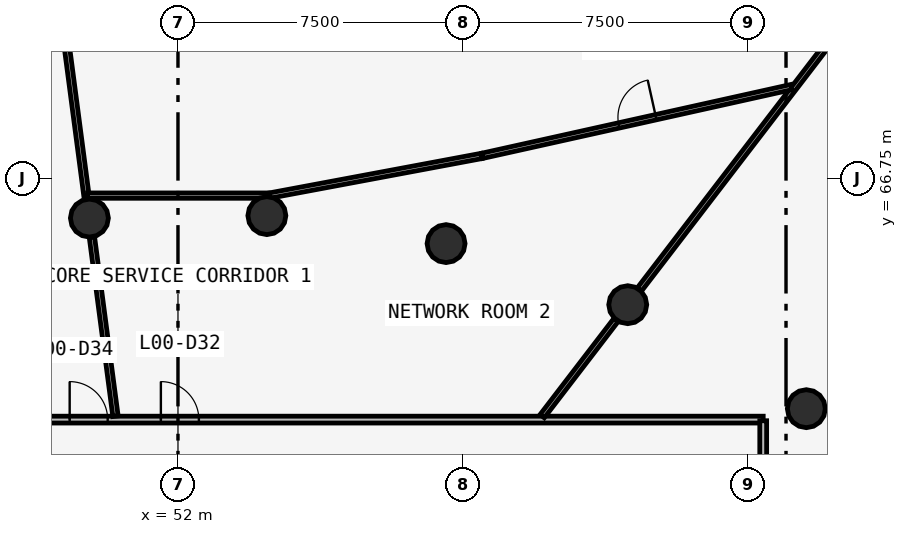
"""IFC4 building model, lengths in metres.
Left out: names, types, materials, properties, quantities, classifications, styles, units other than length and angle.
Written with IfcOpenShell. Run it as: python <this file> out.ifc"""

import sys

from ifc_helpers import new_model, si_unit, direction, frame, frame_2d, origin, origin_2d, place, context, subcontext, project, spatial, rectangle, circle, extrude, source, transform, mapped, element, fill, save


model = new_model("IFC4")
c1 = context("Model", 3, precision=1e-05, world=origin(), true_north=direction((0.0, 1.0)))
c2 = subcontext(c1, "Body", "Model", "MODEL_VIEW")
j1 = project(units=[si_unit("LENGTHUNIT", "METRE"), si_unit("PLANEANGLEUNIT", "RADIAN")], contexts=[c1])
p1 = place(None, origin())
s1 = spatial("IfcSite", under=j1, at=p1, CompositionType="ELEMENT")
p2 = place(p1, origin())
s2 = spatial("IfcBuilding", under=s1, at=p2, CompositionType="ELEMENT")
p3 = place(p2, origin())
s3 = spatial("IfcBuildingStorey", under=s2, at=p3, CompositionType="ELEMENT", Elevation=0.0)
m1 = source(origin(), c2, "Body", "SweptSolid", [
    extrude(circle(Radius=0.5, at=origin_2d()), origin(), (0.0, 0.0, 1.0), 5.35),
])
for number, where, z_axis, x_axis in (
    (1, (68.535, 60.688, -0.35), (0.0, 0.0, 1.0), (1.0, 0.0, 0.0)),
    (2, (63.835, 63.424, -0.35), (0.0, 0.0, 1.0), (1.0, 0.0, 0.0)),
    (3, (59.055, 65.031, -0.35), (0.0, 0.0, 1.0), (1.0, 0.0, 0.0)),
    (4, (54.339, 65.767, -0.35), (0.0, 0.0, 1.0), (1.0, 0.0, 0.0)),
    (5, (49.669, 65.703, -0.35), (0.0, 0.0, 1.0), (1.0, 0.0, 0.0)),
):
    element("IfcColumn", number, at=place(p3, frame(where, z_axis=z_axis, x_axis=x_axis)), inside=s3, PredefinedType="COLUMN", context=c2, shape_type="MappedRepresentation", body=[
        mapped(m1, transform((0.0, 0.0, 0.0), scale=1.0)),
    ])
p4 = place(p3, frame((36.6, 60.4, 0.0), z_axis=(0.0, 0.0, 1.0), x_axis=(1.0, 0.0, 0.0)))
e6 = element("IfcWall", 6, at=p4, inside=s3, PredefinedType="PARTITIONING", context=c2, shape_type="SweptSolid", body=[
    extrude(rectangle(XDim=30.8, YDim=0.18, at=frame_2d((15.4, 0.0))), origin(), (0.0, 0.0, 1.0), 3.85),
])
p5 = place(p4, frame((14.95, 0.0, 0.0)))
e7 = element("IfcOpeningElement", 7, at=p5, cuts=e6, PredefinedType="OPENING", context=c2, shape_type="SweptSolid", body=[
    extrude(rectangle(XDim=1.0, YDim=2.1, at=frame_2d((0.5, 1.05))), frame((0.0, 0.1, 0.0), z_axis=(0.0, -1.0, 0.0), x_axis=(1.0, 0.0, 0.0)), (0.0, 0.0, 1.0), 0.2),
])
p6 = place(p4, frame((12.55, 0.0, 0.0)))
e8 = element("IfcOpeningElement", 8, at=p6, cuts=e6, PredefinedType="OPENING", context=c2, shape_type="SweptSolid", body=[
    extrude(rectangle(XDim=1.0, YDim=2.1, at=frame_2d((0.5, 1.05))), frame((0.0, 0.1, 0.0), z_axis=(0.0, -1.0, 0.0), x_axis=(1.0, 0.0, 0.0)), (0.0, 0.0, 1.0), 0.2),
])
p7 = place(p3, frame((67.4, 60.37, 0.0), z_axis=(0.0, 0.0, 1.0), x_axis=(0.0, -1.0, 0.0)))
e9 = element("IfcWall", 9, at=p7, inside=s3, PredefinedType="PARTITIONING", context=c2, shape_type="SweptSolid", body=[
    extrude(rectangle(XDim=23.583, YDim=0.18, at=frame_2d((11.791, 0.0))), origin(), (0.0, 0.0, 1.0), 3.85),
])
p8 = place(p7, frame((11.333, 0.0, 0.0)))
e10 = element("IfcOpeningElement", 10, at=p8, cuts=e9, PredefinedType="OPENING", context=c2, shape_type="SweptSolid", body=[
    extrude(rectangle(XDim=1.0, YDim=2.1, at=frame_2d((0.5, 1.05))), frame((0.0, 0.1, 0.0), z_axis=(0.0, -1.0, 0.0), x_axis=(1.0, 0.0, 0.0)), (0.0, 0.0, 1.0), 0.2),
])
p9 = place(p7, frame((4.532, 0.0, 0.0)))
e11 = element("IfcOpeningElement", 11, at=p9, cuts=e9, PredefinedType="OPENING", context=c2, shape_type="SweptSolid", body=[
    extrude(rectangle(XDim=1.0, YDim=2.1, at=frame_2d((0.5, 1.05))), frame((0.0, 0.1, 0.0), z_axis=(0.0, -1.0, 0.0), x_axis=(1.0, 0.0, 0.0)), (0.0, 0.0, 1.0), 0.2),
])
p10 = place(p3, frame((70.064, 71.541, 0.0), z_axis=(0.0, 0.0, 1.0), x_axis=(-0.608770295053, -0.793346537057, 0.0)))
e12 = element("IfcWall", 12, at=p10, inside=s3, PredefinedType="PARTITIONING", context=c2, shape_type="SweptSolid", body=[
    extrude(rectangle(XDim=9.727, YDim=0.14, at=frame_2d((4.864, 0.0))), origin(), (0.0, 0.0, 1.0), 3.85),
])
p11 = place(p3, frame((49.592, 66.294, 0.0), z_axis=(0.0, 0.0, 1.0), x_axis=(-0.130530349162, 0.991444314093, 0.0)))
e13 = element("IfcWall", 13, at=p11, inside=s3, PredefinedType="PARTITIONING", context=c2, shape_type="SweptSolid", body=[
    extrude(rectangle(XDim=8.744, YDim=0.14, at=frame_2d((4.372, 0.0))), origin(), (0.0, 0.0, 1.0), 3.85),
])
p12 = place(p3, frame((60.012, 67.342, 0.0), z_axis=(0.0, 0.0, 1.0), x_axis=(0.976160147814, 0.217051528031, 0.0)))
e14 = element("IfcWall", 14, at=p12, inside=s3, PredefinedType="PARTITIONING", context=c2, shape_type="SweptSolid", body=[
    extrude(rectangle(XDim=8.327, YDim=0.14, at=frame_2d((4.164, 0.0))), origin(), (0.0, 0.0, 1.0), 3.85),
])
p13 = place(p12, frame((3.677, 0.0, 0.0)))
e15 = element("IfcOpeningElement", 15, at=p13, cuts=e14, PredefinedType="OPENING", context=c2, shape_type="SweptSolid", body=[
    extrude(rectangle(XDim=1.0, YDim=2.1, at=frame_2d((0.5, 1.05))), frame((0.0, 0.08, 0.0), z_axis=(0.0, -1.0, 0.0), x_axis=(1.0, 0.0, 0.0)), (0.0, 0.0, 1.0), 0.16),
])
p14 = place(p3, frame((59.982, 67.337, 0.0), z_axis=(0.0, 0.0, 1.0), x_axis=(-0.982948623255, -0.183880406899, 0.0)))
e16 = element("IfcWall", 16, at=p14, inside=s3, PredefinedType="PARTITIONING", context=c2, shape_type="SweptSolid", body=[
    extrude(rectangle(XDim=5.671, YDim=0.14, at=frame_2d((2.835, 0.0))), origin(), (0.0, 0.0, 1.0), 3.85),
])
p15 = place(p3, frame((50.356, 60.49, 0.0), z_axis=(0.0, 0.0, 1.0), x_axis=(-0.130548834981, 0.991441880135, 0.0)))
e17 = element("IfcWall", 17, at=p15, inside=s3, PredefinedType="PARTITIONING", context=c2, shape_type="SweptSolid", body=[
    extrude(rectangle(XDim=4.754, YDim=0.14, at=frame_2d((2.377, 0.0))), origin(), (0.0, 0.0, 1.0), 3.85),
])
p16 = place(p3, frame((54.378, 66.294, 0.0), z_axis=(0.0, 0.0, 1.0), x_axis=(-1.0, 0.0, 0.0)))
e18 = element("IfcWall", 18, at=p16, inside=s3, PredefinedType="PARTITIONING", context=c2, shape_type="SweptSolid", body=[
    extrude(rectangle(XDim=4.757, YDim=0.14, at=frame_2d((2.378, 0.0))), origin(), (0.0, 0.0, 1.0), 3.85),
])
p17 = place(p3, frame((63.528, 63.024, 0.0), z_axis=(0.0, 0.0, 1.0), x_axis=(-0.60874605662, -0.793365135703, 0.0)))
e19 = element("IfcWall", 19, at=p17, inside=s3, PredefinedType="PARTITIONING", context=c2, shape_type="SweptSolid", body=[
    extrude(rectangle(XDim=3.194, YDim=0.14, at=frame_2d((1.597, 0.0))), origin(), (0.0, 0.0, 1.0), 3.85),
])
m2 = source(origin(), c2, "Body", "SweptSolid", [
    extrude(rectangle(XDim=1.0, YDim=2.1, at=frame_2d((0.5, 1.05))), frame((0.0, 0.025, 0.0), z_axis=(0.0, -1.0, 0.0), x_axis=(1.0, 0.0, 0.0)), (0.0, 0.0, 1.0), 0.05),
])
p18 = place(p5, origin())
e20 = element("IfcDoor", 20, at=p18, inside=s3, OperationType="SINGLE_SWING_LEFT", PredefinedType="DOOR", context=c2, shape_type="MappedRepresentation", body=[
    mapped(m2, transform((0.0, 0.0, 0.0), scale=1.0)),
])
fill(e7, e20)
p19 = place(p13, origin())
e21 = element("IfcDoor", 21, at=p19, inside=s3, OperationType="SINGLE_SWING_RIGHT", PredefinedType="DOOR", context=c2, shape_type="MappedRepresentation", body=[
    mapped(m2, transform((0.0, 0.0, 0.0), scale=1.0)),
])
fill(e15, e21)
p20 = place(p6, origin())
e22 = element("IfcDoor", 22, at=p20, inside=s3, OperationType="SINGLE_SWING_LEFT", PredefinedType="DOOR", context=c2, shape_type="MappedRepresentation", body=[
    mapped(m2, transform((0.0, 0.0, 0.0), scale=1.0)),
])
fill(e8, e22)
save(model, sys.argv[1])
